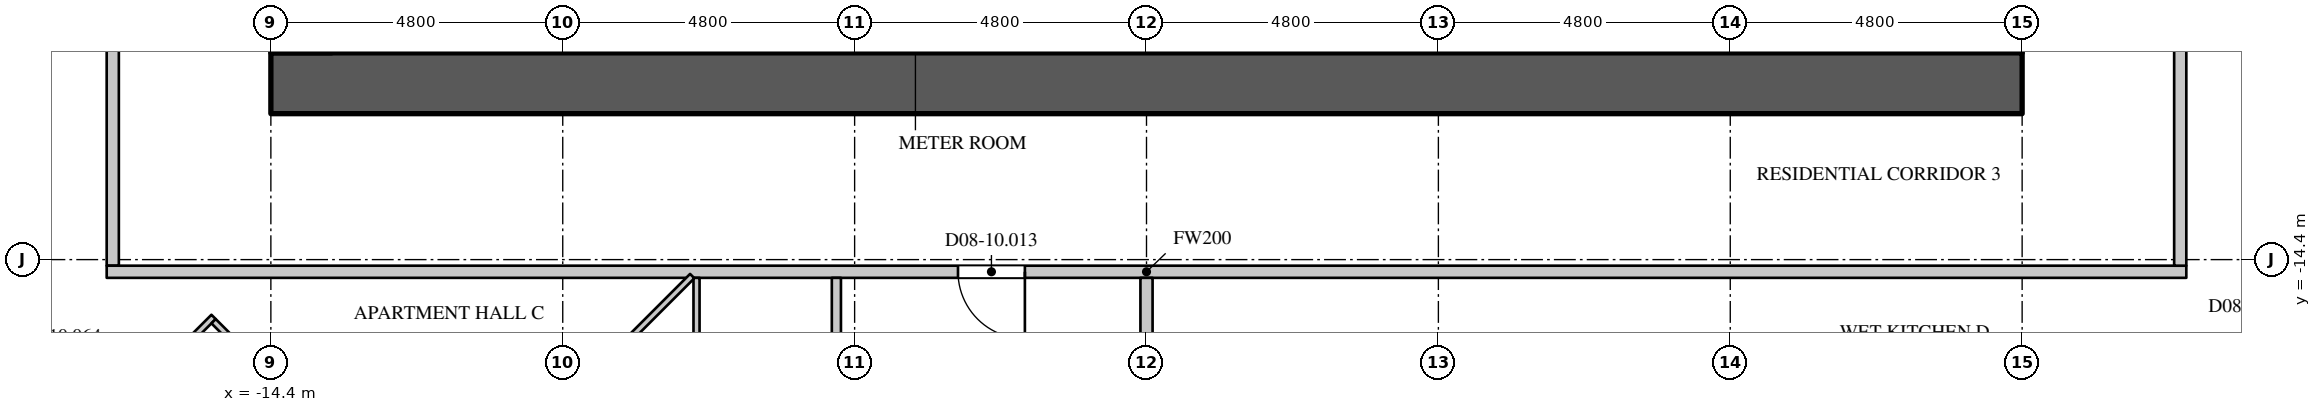
"""IFC4 building model, lengths in metres.
Left out: names, types, materials, properties, quantities, classifications, styles, units other than length and angle.
Written with IfcOpenShell. Run it as: python <this file> out.ifc"""

import sys

from ifc_helpers import new_model, si_unit, direction, frame, frame_2d, origin, place, context, subcontext, project, spatial, rectangle, extrude, element, fill, save


model = new_model("IFC4")
c1 = context("Model", 3, precision=1e-05, world=origin(), true_north=direction((0.0, 1.0)))
c2 = subcontext(c1, "Body", "Model", "MODEL_VIEW")
j1 = project(units=[si_unit("LENGTHUNIT", "METRE"), si_unit("PLANEANGLEUNIT", "RADIAN")], contexts=[c1])
p1 = place(None, origin())
s1 = spatial("IfcSite", under=j1, at=p1, CompositionType="ELEMENT")
p2 = place(p1, origin())
s2 = spatial("IfcBuilding", under=s1, at=p2, CompositionType="ELEMENT")
p3 = place(p2, frame((0.0, 0.0, 38.1)))
s3 = spatial("IfcBuildingStorey", under=s2, at=p3, CompositionType="ELEMENT", Elevation=38.1)
p4 = place(p3, frame((-14.4, -11.5, 0.0), z_axis=(0.0, 0.0, 1.0), x_axis=(1.0, 0.0, 0.0)))
e1 = element("IfcWall", 1, at=p4, inside=s3, PredefinedType="SHEAR", context=c2, shape_type="SweptSolid", body=[
    extrude(rectangle(XDim=28.8, YDim=1.0, at=frame_2d((14.4, 0.0))), origin(), (0.0, 0.0, 1.0), 4.2),
])
p5 = place(p3, frame((-17.0, -14.5, 0.0), z_axis=(0.0, 0.0, 1.0), x_axis=(0.0, 1.0, 0.0)))
e2 = element("IfcWall", 2, at=p5, inside=s3, PredefinedType="PARTITIONING", context=c2, shape_type="SweptSolid", body=[
    extrude(rectangle(XDim=29.0, YDim=0.2, at=frame_2d((14.5, 0.0))), origin(), (0.0, 0.0, 1.0), 3.95),
])
p6 = place(p5, frame((16.55, 0.0, 0.0)))
e3 = element("IfcOpeningElement", 3, at=p6, cuts=e2, PredefinedType="OPENING", context=c2, shape_type="SweptSolid", body=[
    extrude(rectangle(XDim=1.1, YDim=2.4, at=frame_2d((0.55, 1.2))), frame((0.0, 0.11, 0.0), z_axis=(0.0, -1.0, 0.0), x_axis=(1.0, 0.0, 0.0)), (0.0, 0.0, 1.0), 0.22),
])
p7 = place(p3, frame((-17.1, -14.6, 0.0), z_axis=(0.0, 0.0, 1.0), x_axis=(1.0, 0.0, 0.0)))
e4 = element("IfcWall", 4, at=p7, inside=s3, PredefinedType="PARTITIONING", context=c2, shape_type="SweptSolid", body=[
    extrude(rectangle(XDim=34.2, YDim=0.2, at=frame_2d((17.1, 0.0))), origin(), (0.0, 0.0, 1.0), 3.95),
])
p8 = place(p7, frame((14.0, 0.0, 0.0)))
e5 = element("IfcOpeningElement", 5, at=p8, cuts=e4, PredefinedType="OPENING", context=c2, shape_type="SweptSolid", body=[
    extrude(rectangle(XDim=1.1, YDim=2.4, at=frame_2d((0.55, 1.2))), frame((0.0, 0.11, 0.0), z_axis=(0.0, -1.0, 0.0), x_axis=(1.0, 0.0, 0.0)), (0.0, 0.0, 1.0), 0.22),
])
p9 = place(p3, frame((17.0, -14.5, 0.0), z_axis=(0.0, 0.0, 1.0), x_axis=(0.0, 1.0, 0.0)))
e6 = element("IfcWall", 6, at=p9, inside=s3, PredefinedType="PARTITIONING", context=c2, shape_type="SweptSolid", body=[
    extrude(rectangle(XDim=29.0, YDim=0.2, at=frame_2d((14.5, 0.0))), origin(), (0.0, 0.0, 1.0), 3.95),
])
p10 = place(p9, frame((15.9, 0.0, 0.0)))
e7 = element("IfcOpeningElement", 7, at=p10, cuts=e6, PredefinedType="OPENING", context=c2, shape_type="SweptSolid", body=[
    extrude(rectangle(XDim=1.1, YDim=2.4, at=frame_2d((0.55, 1.2))), frame((0.0, 0.11, 0.0), z_axis=(0.0, -1.0, 0.0), x_axis=(1.0, 0.0, 0.0)), (0.0, 0.0, 1.0), 0.22),
])
p11 = place(p9, frame((6.55, 0.0, 0.0)))
e8 = element("IfcOpeningElement", 8, at=p11, cuts=e6, PredefinedType="OPENING", context=c2, shape_type="SweptSolid", body=[
    extrude(rectangle(XDim=1.1, YDim=2.4, at=frame_2d((0.55, 1.2))), frame((0.0, 0.11, 0.0), z_axis=(0.0, -1.0, 0.0), x_axis=(1.0, 0.0, 0.0)), (0.0, 0.0, 1.0), 0.22),
])
p12 = place(p3, frame((-22.947, -12.051, 0.0), z_axis=(0.0, 0.0, 1.0), x_axis=(0.707106781187, -0.707106781187, 0.0)))
e9 = element("IfcWall", 9, at=p12, inside=s3, PredefinedType="PARTITIONING", context=c2, shape_type="SweptSolid", body=[
    extrude(rectangle(XDim=7.705, YDim=0.15, at=frame_2d((3.853, 0.0))), origin(), (0.0, 0.0, 1.0), 3.95),
])
p13 = place(p12, frame((4.65, 0.0, 0.0)))
e10 = element("IfcOpeningElement", 10, at=p13, cuts=e9, PredefinedType="OPENING", context=c2, shape_type="SweptSolid", body=[
    extrude(rectangle(XDim=0.95, YDim=2.2, at=frame_2d((0.475, 1.1))), frame((0.0, 0.085, 0.0), z_axis=(0.0, -1.0, 0.0), x_axis=(1.0, 0.0, 0.0)), (0.0, 0.0, 1.0), 0.17),
])
p14 = place(p3, frame((-5.1, -21.725, 0.0), z_axis=(0.0, 0.0, 1.0), x_axis=(0.0, 1.0, 0.0)))
e11 = element("IfcWall", 11, at=p14, inside=s3, PredefinedType="PARTITIONING", context=c2, shape_type="SweptSolid", body=[
    extrude(rectangle(XDim=7.025, YDim=0.15, at=frame_2d((3.513, 0.0))), origin(), (0.0, 0.0, 1.0), 3.95),
])
p15 = place(p14, frame((3.05, 0.0, 0.0)))
e12 = element("IfcOpeningElement", 12, at=p15, cuts=e11, PredefinedType="OPENING", context=c2, shape_type="SweptSolid", body=[
    extrude(rectangle(XDim=0.95, YDim=2.2, at=frame_2d((0.475, 1.1))), frame((0.0, 0.085, 0.0), z_axis=(0.0, -1.0, 0.0), x_axis=(1.0, 0.0, 0.0)), (0.0, 0.0, 1.0), 0.17),
])
p16 = place(p3, frame((16.02, -18.695, 0.0), z_axis=(0.0, 0.0, 1.0), x_axis=(0.707106781187, 0.707106781187, 0.0)))
e13 = element("IfcWall", 13, at=p16, inside=s3, PredefinedType="PARTITIONING", context=c2, shape_type="SweptSolid", body=[
    extrude(rectangle(XDim=9.663, YDim=0.15, at=frame_2d((4.832, 0.0))), origin(), (0.0, 0.0, 1.0), 3.95),
])
p17 = place(p16, frame((4.1, 0.0, 0.0)))
e14 = element("IfcOpeningElement", 14, at=p17, cuts=e13, PredefinedType="OPENING", context=c2, shape_type="SweptSolid", body=[
    extrude(rectangle(XDim=0.95, YDim=2.2, at=frame_2d((0.475, 1.1))), frame((0.0, 0.085, 0.0), z_axis=(0.0, -1.0, 0.0), x_axis=(1.0, 0.0, 0.0)), (0.0, 0.0, 1.0), 0.17),
])
p18 = place(p3, frame((0.0, -28.855, 0.0), z_axis=(0.0, 0.0, 1.0), x_axis=(0.0, 1.0, 0.0)))
e15 = element("IfcWall", 15, at=p18, inside=s3, PredefinedType="PARTITIONING", context=c2, shape_type="SweptSolid", body=[
    extrude(rectangle(XDim=14.155, YDim=0.2, at=frame_2d((7.078, 0.0))), origin(), (0.0, 0.0, 1.0), 3.95),
])
p19 = place(p3, frame((-17.485, -17.485, 0.0), z_axis=(0.0, 0.0, 1.0), x_axis=(0.707106781187, 0.707106781187, 0.0)))
e16 = element("IfcWall", 16, at=p19, inside=s3, PredefinedType="PARTITIONING", context=c2, shape_type="SweptSolid", body=[
    extrude(rectangle(XDim=3.03, YDim=0.1, at=frame_2d((1.515, 0.0))), origin(), (0.0, 0.0, 1.0), 3.95),
])
p20 = place(p3, frame((-15.342, -15.413, 0.0), z_axis=(0.0, 0.0, 1.0), x_axis=(0.707106781187, -0.707106781187, 0.0)))
e17 = element("IfcWall", 17, at=p20, inside=s3, PredefinedType="PARTITIONING", context=c2, shape_type="SweptSolid", body=[
    extrude(rectangle(XDim=2.7, YDim=0.1, at=frame_2d((1.35, 0.0))), origin(), (0.0, 0.0, 1.0), 3.95),
])
p21 = place(p3, frame((-9.565, -16.765, 0.0), z_axis=(0.0, 0.0, 1.0), x_axis=(0.707106781187, 0.707106781187, 0.0)))
e18 = element("IfcWall", 18, at=p21, inside=s3, PredefinedType="PARTITIONING", context=c2, shape_type="SweptSolid", body=[
    extrude(rectangle(XDim=2.961, YDim=0.1, at=frame_2d((1.481, 0.0))), origin(), (0.0, 0.0, 1.0), 3.95),
])
p22 = place(p3, frame((-7.4, -21.725, 0.0), z_axis=(0.0, 0.0, 1.0), x_axis=(0.0, 1.0, 0.0)))
e19 = element("IfcWall", 19, at=p22, inside=s3, PredefinedType="PARTITIONING", context=c2, shape_type="SweptSolid", body=[
    extrude(rectangle(XDim=7.025, YDim=0.1, at=frame_2d((3.513, 0.0))), origin(), (0.0, 0.0, 1.0), 3.95),
])
p23 = place(p8, origin())
e20 = element("IfcDoor", 20, at=p23, inside=s3, OperationType="SINGLE_SWING_LEFT", PredefinedType="DOOR", context=c2, shape_type="SweptSolid", body=[
    extrude(rectangle(XDim=1.1, YDim=2.4, at=frame_2d((0.55, 1.2))), frame((0.0, 0.025, 0.0), z_axis=(0.0, -1.0, 0.0), x_axis=(1.0, 0.0, 0.0)), (0.0, 0.0, 1.0), 0.05),
])
fill(e5, e20)
save(model, sys.argv[1])
